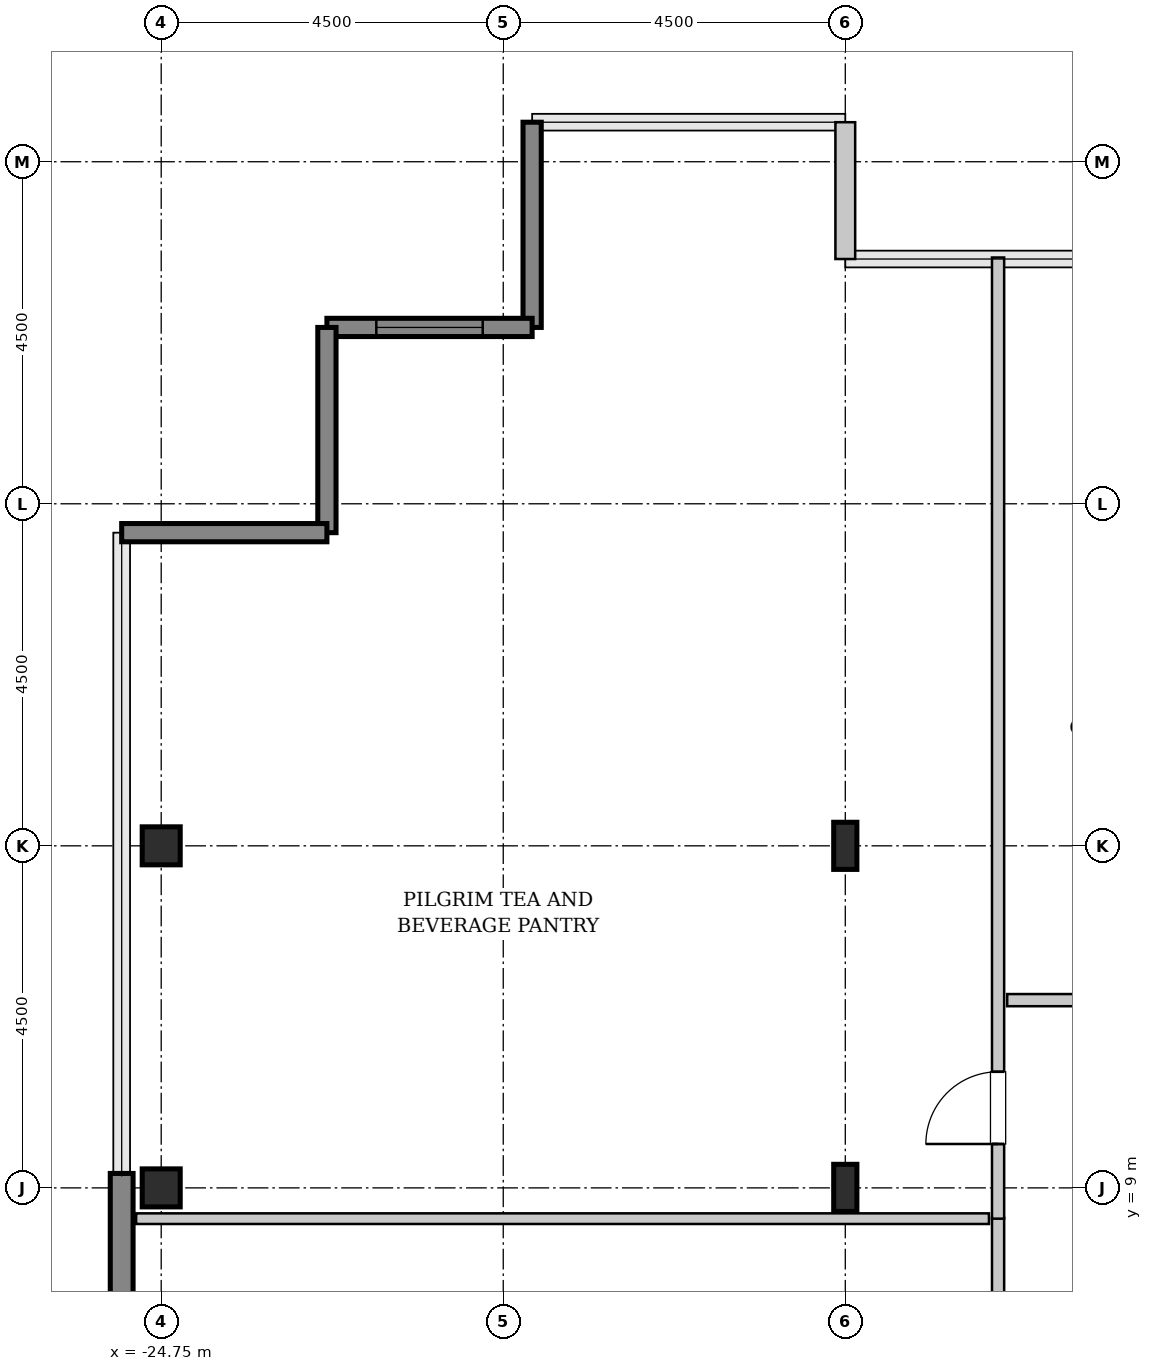
"""IFC4 building model, lengths in metres.
Left out: names, types, materials, properties, quantities, classifications, styles, units other than length and angle.
Written with IfcOpenShell. Run it as: python <this file> out.ifc"""

import sys

from ifc_helpers import new_model, si_unit, direction, frame, frame_2d, origin, origin_2d, place, context, subcontext, project, spatial, rectangle, hollow_rectangle, i_section, extrude, source, transform, mapped, element, fill, save


model = new_model("IFC4")
c1 = context("Model", 3, precision=1e-05, world=origin(), true_north=direction((0.0, 1.0)))
c2 = subcontext(c1, "Body", "Model", "MODEL_VIEW")
j1 = project(units=[si_unit("LENGTHUNIT", "METRE"), si_unit("PLANEANGLEUNIT", "RADIAN")], contexts=[c1])
p1 = place(None, origin())
s1 = spatial("IfcSite", under=j1, at=p1, CompositionType="ELEMENT")
p2 = place(p1, origin())
s2 = spatial("IfcBuilding", under=s1, at=p2, CompositionType="ELEMENT")
p3 = place(p2, frame((0.0, 0.0, 298.8)))
s3 = spatial("IfcBuildingStorey", under=s2, at=p3, CompositionType="ELEMENT", Elevation=298.8)
m1 = source(origin(), c2, "Body", "SweptSolid", [
    extrude(hollow_rectangle(XDim=0.5, YDim=0.5, WallThickness=0.025, InnerFilletRadius=0.025, OuterFilletRadius=0.05, at=origin_2d()), origin(), (0.0, 0.0, 1.0), 3.8),
])
for number, where, z_axis, x_axis in (
    (1, (-24.75, 9.0, 0.0), (0.0, 0.0, 1.0), (1.0, 0.0, 0.0)),
    (2, (-24.75, 13.5, 0.0), (0.0, 0.0, 1.0), (1.0, 0.0, 0.0)),
):
    element("IfcColumn", number, at=place(p3, frame(where, z_axis=z_axis, x_axis=x_axis)), inside=s3, PredefinedType="COLUMN", context=c2, shape_type="MappedRepresentation", body=[
        mapped(m1, transform((0.0, 0.0, 0.0), x_axis=(1.0, 0.0, 0.0), y_axis=(0.0, 1.0, 0.0), z_axis=(0.0, 0.0, 1.0), scale=1.0)),
    ])
m2 = source(origin(), c2, "Body", "SweptSolid", [
    extrude(i_section(OverallWidth=0.305, OverallDepth=0.62, WebThickness=0.021, FlangeThickness=0.04, FilletRadius=0.027, at=origin_2d()), origin(), (0.0, 0.0, 1.0), 3.8),
])
for number, where, z_axis, x_axis in (
    (3, (-15.75, 9.0, 0.0), (0.0, 0.0, 1.0), (1.0, 0.0, 0.0)),
    (4, (-15.75, 13.5, 0.0), (0.0, 0.0, 1.0), (1.0, 0.0, 0.0)),
):
    element("IfcColumn", number, at=place(p3, frame(where, z_axis=z_axis, x_axis=x_axis)), inside=s3, PredefinedType="COLUMN", context=c2, shape_type="MappedRepresentation", body=[
        mapped(m2, transform((0.0, 0.0, 0.0), x_axis=(1.0, 0.0, 0.0), y_axis=(0.0, 1.0, 0.0), z_axis=(0.0, 0.0, 1.0), scale=1.0)),
    ])
m3 = source(origin(), c2, "Body", "SweptSolid", [
    extrude(rectangle(XDim=4.88, YDim=0.3, at=frame_2d((2.44, 0.0))), origin(), (0.0, 0.0, 1.0), 3.55),
])
p4 = place(p3, frame((-25.27, 4.31, 0.0), z_axis=(0.0, 0.0, 1.0), x_axis=(0.0, 1.0, 0.0)))
e5 = element("IfcWall", 5, at=p4, inside=s3, PredefinedType="SHEAR", context=c2, shape_type="MappedRepresentation", body=[
    mapped(m3, transform((0.0, 0.0, 0.0), x_axis=(1.0, 0.0, 0.0), y_axis=(0.0, 1.0, 0.0), z_axis=(0.0, 0.0, 1.0), scale=1.0)),
])
m4 = source(origin(), c2, "Body", "SweptSolid", [
    extrude(rectangle(XDim=1.8, YDim=0.26, at=frame_2d((0.9, 0.0))), origin(), (0.0, 0.0, 1.0), 3.55),
])
p5 = place(p3, frame((-15.75, 21.22, 0.0), z_axis=(0.0, 0.0, 1.0), x_axis=(0.0, 1.0, 0.0)))
e6 = element("IfcWall", 6, at=p5, inside=s3, PredefinedType="SOLIDWALL", context=c2, shape_type="MappedRepresentation", body=[
    mapped(m4, transform((0.0, 0.0, 0.0), x_axis=(1.0, 0.0, 0.0), y_axis=(0.0, 1.0, 0.0), z_axis=(0.0, 0.0, 1.0), scale=1.0)),
])
m5 = source(origin(), c2, "Body", "SweptSolid", [
    extrude(rectangle(XDim=2.7, YDim=0.24, at=frame_2d((1.35, 0.0))), origin(), (0.0, 0.0, 1.0), 3.55),
])
p6 = place(p3, frame((-19.87, 23.02, 0.0), z_axis=(0.0, 0.0, 1.0), x_axis=(0.0, -1.0, 0.0)))
e7 = element("IfcWall", 7, at=p6, inside=s3, PredefinedType="SHEAR", context=c2, shape_type="MappedRepresentation", body=[
    mapped(m5, transform((0.0, 0.0, 0.0), x_axis=(1.0, 0.0, 0.0), y_axis=(0.0, 1.0, 0.0), z_axis=(0.0, 0.0, 1.0), scale=1.0)),
])
p7 = place(p3, frame((-19.87, 20.32, 0.0), z_axis=(0.0, 0.0, 1.0), x_axis=(-1.0, 0.0, 0.0)))
e8 = element("IfcWall", 8, at=p7, inside=s3, PredefinedType="SHEAR", context=c2, shape_type="MappedRepresentation", body=[
    mapped(m5, transform((0.0, 0.0, 0.0), x_axis=(1.0, 0.0, 0.0), y_axis=(0.0, 1.0, 0.0), z_axis=(0.0, 0.0, 1.0), scale=1.0)),
])
p8 = place(p7, frame((0.65, 0.0, 0.85)))
e9 = element("IfcOpeningElement", 9, at=p8, cuts=e8, PredefinedType="OPENING", context=c2, shape_type="SweptSolid", body=[
    extrude(rectangle(XDim=1.4, YDim=1.8, at=frame_2d((0.7, 0.9))), frame((0.0, 0.13, 0.0), z_axis=(0.0, -1.0, 0.0), x_axis=(1.0, 0.0, 0.0)), (0.0, 0.0, 1.0), 0.26),
])
for number, where, z_axis, x_axis in (
    (10, (-22.57, 20.32, 0.0), (0.0, 0.0, 1.0), (0.0, -1.0, 0.0)),
    (11, (-22.57, 17.62, 0.0), (0.0, 0.0, 1.0), (-1.0, 0.0, 0.0)),
):
    element("IfcWall", number, at=place(p3, frame(where, z_axis=z_axis, x_axis=x_axis)), inside=s3, PredefinedType="SHEAR", context=c2, shape_type="MappedRepresentation", body=[
        mapped(m5, transform((0.0, 0.0, 0.0), x_axis=(1.0, 0.0, 0.0), y_axis=(0.0, 1.0, 0.0), z_axis=(0.0, 0.0, 1.0), scale=1.0)),
    ])
m6 = source(origin(), c2, "Body", "SweptSolid", [
    extrude(rectangle(XDim=3.21, YDim=0.16, at=frame_2d((1.605, 0.0))), origin(), (0.0, 0.0, 1.0), 3.535),
])
p9 = place(p3, frame((-13.74, 5.395, 0.0), z_axis=(0.0, 0.0, 1.0), x_axis=(0.0, 1.0, 0.0)))
e12 = element("IfcWall", 12, at=p9, inside=s3, PredefinedType="PARTITIONING", context=c2, shape_type="MappedRepresentation", body=[
    mapped(m6, transform((0.0, 0.0, 0.0), x_axis=(1.0, 0.0, 0.0), y_axis=(0.0, 1.0, 0.0), z_axis=(0.0, 0.0, 1.0), scale=1.0)),
])
p10 = place(p9, frame((1.13, 0.0, 0.0)))
e13 = element("IfcOpeningElement", 13, at=p10, cuts=e12, PredefinedType="OPENING", context=c2, shape_type="SweptSolid", body=[
    extrude(rectangle(XDim=0.95, YDim=2.1, at=frame_2d((0.475, 1.05))), frame((0.0, 0.09, 0.0), z_axis=(0.0, -1.0, 0.0), x_axis=(1.0, 0.0, 0.0)), (0.0, 0.0, 1.0), 0.18),
])
m7 = source(origin(), c2, "Body", "SweptSolid", [
    extrude(rectangle(XDim=11.22, YDim=0.14, at=frame_2d((5.61, 0.0))), origin(), (0.0, 0.0, 1.0), 2.925),
])
p11 = place(p3, frame((-25.08, 8.595, 0.0), z_axis=(0.0, 0.0, 1.0), x_axis=(1.0, 0.0, 0.0)))
e14 = element("IfcWall", 14, at=p11, inside=s3, PredefinedType="PARTITIONING", context=c2, shape_type="MappedRepresentation", body=[
    mapped(m7, transform((0.0, 0.0, 0.0), x_axis=(1.0, 0.0, 0.0), y_axis=(0.0, 1.0, 0.0), z_axis=(0.0, 0.0, 1.0), scale=1.0)),
])
m8 = source(origin(), c2, "Body", "SweptSolid", [
    extrude(rectangle(XDim=12.645, YDim=0.16, at=frame_2d((6.323, 0.0))), origin(), (0.0, 0.0, 1.0), 3.535),
])
p12 = place(p3, frame((-13.74, 8.595, 0.0), z_axis=(0.0, 0.0, 1.0), x_axis=(0.0, 1.0, 0.0)))
e15 = element("IfcWall", 15, at=p12, inside=s3, PredefinedType="PARTITIONING", context=c2, shape_type="MappedRepresentation", body=[
    mapped(m8, transform((0.0, 0.0, 0.0), x_axis=(1.0, 0.0, 0.0), y_axis=(0.0, 1.0, 0.0), z_axis=(0.0, 0.0, 1.0), scale=1.0)),
])
p13 = place(p12, frame((0.982, 0.0, 0.0)))
e16 = element("IfcOpeningElement", 16, at=p13, cuts=e15, PredefinedType="OPENING", context=c2, shape_type="SweptSolid", body=[
    extrude(rectangle(XDim=0.95, YDim=2.1, at=frame_2d((0.475, 1.05))), frame((0.0, 0.09, 0.0), z_axis=(0.0, -1.0, 0.0), x_axis=(1.0, 0.0, 0.0)), (0.0, 0.0, 1.0), 0.18),
])
m9 = source(origin(), c2, "Body", "SweptSolid", [
    extrude(rectangle(XDim=4.125, YDim=0.16, at=frame_2d((2.062, 0.0))), origin(), (0.0, 0.0, 1.0), 3.535),
])
p14 = place(p3, frame((-13.62, 11.47, 0.0), z_axis=(0.0, 0.0, 1.0), x_axis=(1.0, 0.0, 0.0)))
e17 = element("IfcWall", 17, at=p14, inside=s3, PredefinedType="PARTITIONING", context=c2, shape_type="MappedRepresentation", body=[
    mapped(m9, transform((0.0, 0.0, 0.0), x_axis=(1.0, 0.0, 0.0), y_axis=(0.0, 1.0, 0.0), z_axis=(0.0, 0.0, 1.0), scale=1.0)),
])
p15 = place(p14, frame((1.587, 0.0, 0.0)))
e18 = element("IfcOpeningElement", 18, at=p15, cuts=e17, PredefinedType="OPENING", context=c2, shape_type="SweptSolid", body=[
    extrude(rectangle(XDim=0.95, YDim=2.1, at=frame_2d((0.475, 1.05))), frame((0.0, 0.09, 0.0), z_axis=(0.0, -1.0, 0.0), x_axis=(1.0, 0.0, 0.0)), (0.0, 0.0, 1.0), 0.18),
])
m10 = source(origin(), c2, "Body", "SweptSolid", [
    extrude(rectangle(XDim=1.4, YDim=1.8, at=frame_2d((0.7, 0.9))), frame((0.0, 0.03, 0.0), z_axis=(0.0, -1.0, 0.0), x_axis=(1.0, 0.0, 0.0)), (0.0, 0.0, 1.0), 0.06),
])
p16 = place(p8, origin())
e19 = element("IfcWindow", 19, at=p16, inside=s3, PartitioningType="SINGLE_PANEL", PredefinedType="WINDOW", context=c2, shape_type="MappedRepresentation", body=[
    mapped(m10, transform((0.0, 0.0, 0.0), x_axis=(1.0, 0.0, 0.0), y_axis=(0.0, 1.0, 0.0), z_axis=(0.0, 0.0, 1.0), scale=1.0)),
])
fill(e9, e19)
m11 = source(origin(), c2, "Body", "SweptSolid", [
    extrude(rectangle(XDim=0.95, YDim=2.1, at=frame_2d((0.475, 1.05))), frame((0.0, 0.025, 0.0), z_axis=(0.0, -1.0, 0.0), x_axis=(1.0, 0.0, 0.0)), (0.0, 0.0, 1.0), 0.05),
])
p17 = place(p13, origin())
e20 = element("IfcDoor", 20, at=p17, inside=s3, OperationType="SINGLE_SWING_LEFT", PredefinedType="DOOR", context=c2, shape_type="MappedRepresentation", body=[
    mapped(m11, transform((0.0, 0.0, 0.0), x_axis=(1.0, 0.0, 0.0), y_axis=(0.0, 1.0, 0.0), z_axis=(0.0, 0.0, 1.0), scale=1.0)),
])
fill(e16, e20)
save(model, sys.argv[1])
